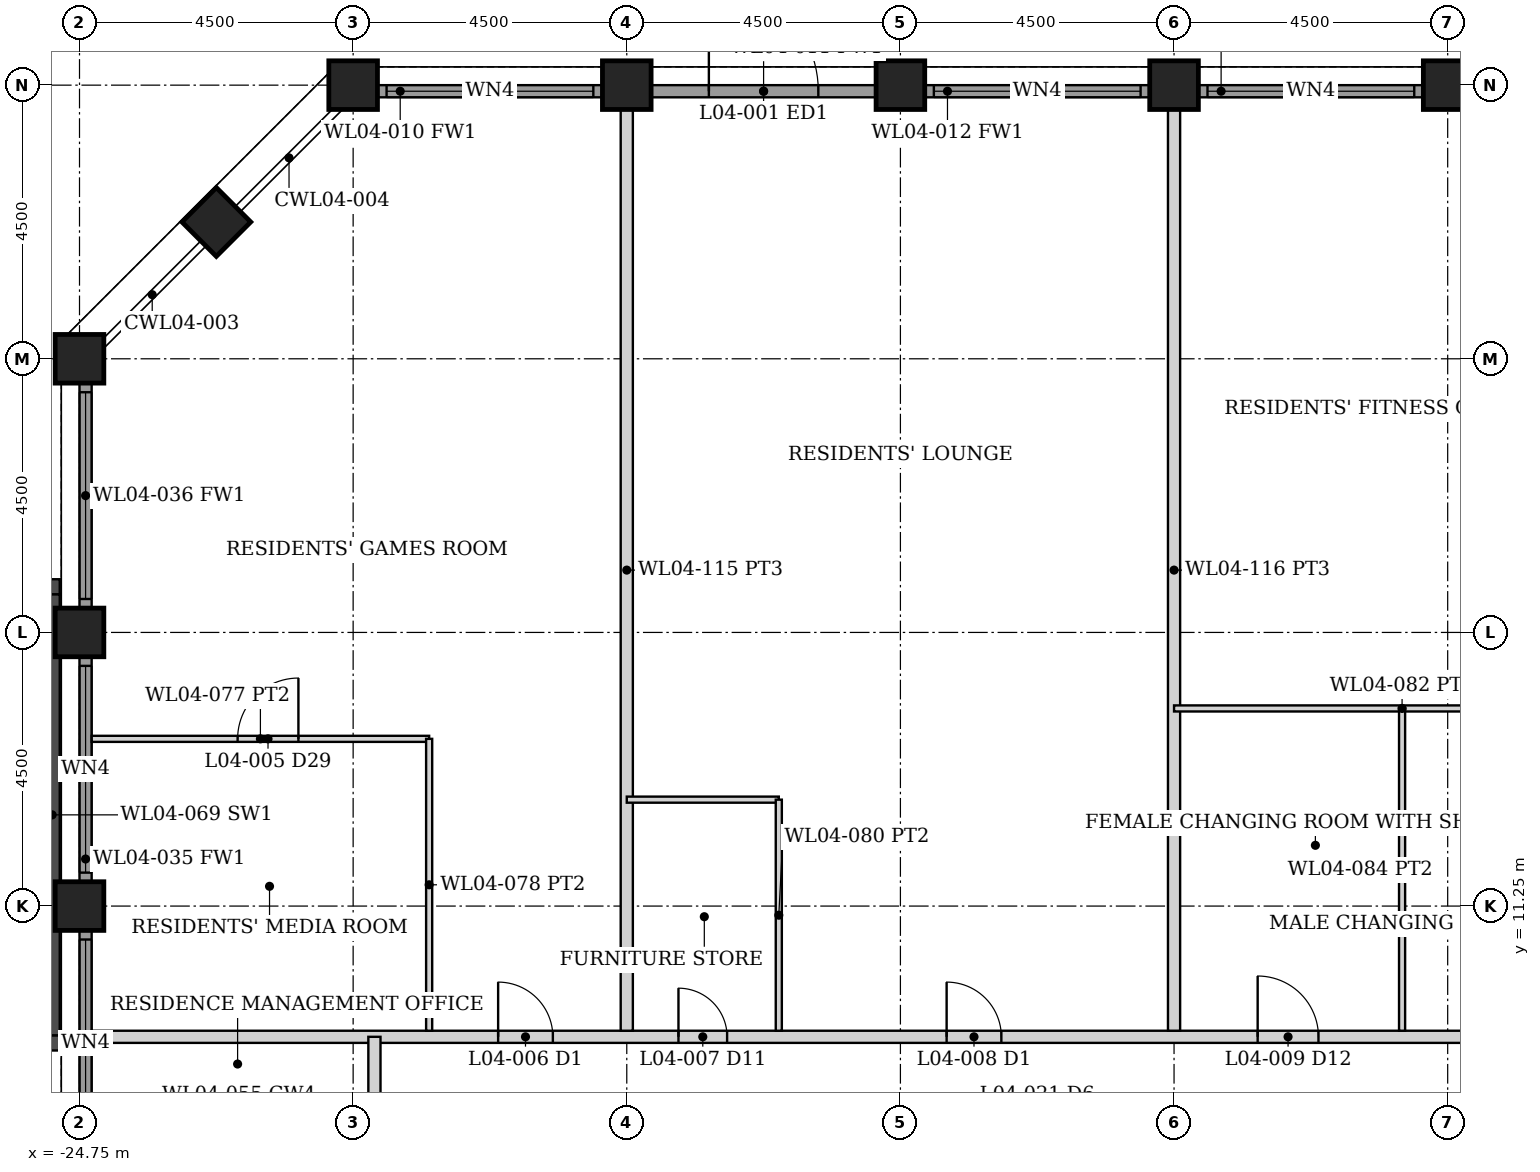
"""IFC4 building model, lengths in metres.
Left out: names, types, materials, properties, quantities, classifications, styles, units other than length and angle.
Written with IfcOpenShell. Run it as: python <this file> out.ifc"""

import sys

from ifc_helpers import new_model, si_unit, direction, frame, frame_2d, origin, origin_2d, place, context, subcontext, project, spatial, rectangle, hollow_rectangle, extrude, element, fill, save


model = new_model("IFC4")
c1 = context("Model", 3, precision=1e-05, world=origin(), true_north=direction((0.0, 1.0)))
c2 = subcontext(c1, "Body", "Model", "MODEL_VIEW")
j1 = project(units=[si_unit("LENGTHUNIT", "METRE"), si_unit("PLANEANGLEUNIT", "RADIAN")], contexts=[c1])
p1 = place(None, origin())
s1 = spatial("IfcSite", under=j1, at=p1, CompositionType="ELEMENT")
p2 = place(p1, origin())
s2 = spatial("IfcBuilding", under=s1, at=p2, CompositionType="ELEMENT")
p3 = place(p2, frame((0.0, 0.0, 21.5)))
s3 = spatial("IfcBuildingStorey", under=s2, at=p3, CompositionType="ELEMENT", Elevation=21.5)
for number, where, z_axis, x_axis in (
    (1, (-20.25, 24.75, 0.0), (0.0, 0.0, 1.0), (0.0, 1.0, 0.0)),
    (2, (-15.75, 24.75, 0.0), (0.0, 0.0, 1.0), (0.0, 1.0, 0.0)),
    (3, (-11.25, 24.75, 0.0), (0.0, 0.0, 1.0), (0.0, 1.0, 0.0)),
    (4, (-6.75, 24.75, 0.0), (0.0, 0.0, 1.0), (0.0, 1.0, 0.0)),
    (5, (-2.25, 24.75, 0.0), (0.0, 0.0, 1.0), (0.0, 1.0, 0.0)),
    (6, (-24.75, 11.25, 0.0), (0.0, 0.0, 1.0), (1.0, 0.0, 0.0)),
    (7, (-24.75, 15.75, 0.0), (0.0, 0.0, 1.0), (1.0, 0.0, 0.0)),
    (8, (-24.75, 20.25, 0.0), (0.0, 0.0, 1.0), (1.0, 0.0, 0.0)),
    (9, (-22.5, 22.5, 0.0), (0.0, 0.0, 1.0), (0.707, -0.707, 0.0)),
):
    element("IfcColumn", number, at=place(p3, frame(where, z_axis=z_axis, x_axis=x_axis)), inside=s3, PredefinedType="COLUMN", context=c2, shape_type="SweptSolid", body=[
        extrude(hollow_rectangle(XDim=0.8, YDim=0.8, WallThickness=0.08, at=origin_2d()), origin(), (0.0, 0.0, 1.0), 5.0),
    ])
p4 = place(p3, frame((-28.625, 9.0, 0.0), z_axis=(0.0, 0.0, 1.0), x_axis=(1.0, 0.0, 0.0)))
e10 = element("IfcWall", 10, at=p4, inside=s3, PredefinedType="SHEAR", context=c2, shape_type="SweptSolid", body=[
    extrude(rectangle(XDim=3.55, YDim=0.25, at=frame_2d((1.775, 0.0))), origin(), (0.0, 0.0, 1.0), 5.0),
])
p5 = place(p4, frame((1.875, 0.0, 0.0)))
e11 = element("IfcOpeningElement", 11, at=p5, cuts=e10, PredefinedType="OPENING", context=c2, shape_type="SweptSolid", body=[
    extrude(rectangle(XDim=1.2, YDim=2.2, at=frame_2d((0.6, 1.1))), frame((0.0, 0.135, 0.0), z_axis=(0.0, -1.0, 0.0), x_axis=(1.0, 0.0, 0.0)), (0.0, 0.0, 1.0), 0.27),
])
p6 = place(p3, frame((-28.625, 16.5, 0.0), z_axis=(0.0, 0.0, 1.0), x_axis=(1.0, 0.0, 0.0)))
e12 = element("IfcWall", 12, at=p6, inside=s3, PredefinedType="SHEAR", context=c2, shape_type="SweptSolid", body=[
    extrude(rectangle(XDim=3.55, YDim=0.25, at=frame_2d((1.775, 0.0))), origin(), (0.0, 0.0, 1.0), 5.0),
])
p7 = place(p3, frame((-25.2, 9.125, 0.0), z_axis=(0.0, 0.0, 1.0), x_axis=(0.0, 1.0, 0.0)))
e13 = element("IfcWall", 13, at=p7, inside=s3, PredefinedType="SHEAR", context=c2, shape_type="SweptSolid", body=[
    extrude(rectangle(XDim=7.25, YDim=0.25, at=frame_2d((3.625, 0.0))), origin(), (0.0, 0.0, 1.0), 5.0),
])
p8 = place(p3, frame((-19.845, 24.65, 0.0), z_axis=(0.0, 0.0, 1.0), x_axis=(1.0, 0.0, 0.0)))
e14 = element("IfcWall", 14, at=p8, inside=s3, PredefinedType="SOLIDWALL", context=c2, shape_type="SweptSolid", body=[
    extrude(rectangle(XDim=3.69, YDim=0.2, at=frame_2d((1.845, 0.0))), origin(), (0.0, 0.0, 1.0), 3.879),
])
p9 = place(p8, frame((0.145, 0.0, 0.3)))
e15 = element("IfcOpeningElement", 15, at=p9, cuts=e14, PredefinedType="OPENING", context=c2, shape_type="SweptSolid", body=[
    extrude(rectangle(XDim=3.4, YDim=3.429, at=frame_2d((1.7, 1.714))), frame((0.0, 0.11, 0.0), z_axis=(0.0, -1.0, 0.0), x_axis=(1.0, 0.0, 0.0)), (0.0, 0.0, 1.0), 0.22),
])
p10 = place(p3, frame((-15.345, 24.65, 0.0), z_axis=(0.0, 0.0, 1.0), x_axis=(1.0, 0.0, 0.0)))
e16 = element("IfcWall", 16, at=p10, inside=s3, PredefinedType="SOLIDWALL", context=c2, shape_type="SweptSolid", body=[
    extrude(rectangle(XDim=3.69, YDim=0.2, at=frame_2d((1.845, 0.0))), origin(), (0.0, 0.0, 1.0), 3.879),
])
p11 = place(p10, frame((0.945, 0.0, 0.0)))
e17 = element("IfcOpeningElement", 17, at=p11, cuts=e16, PredefinedType="OPENING", context=c2, shape_type="SweptSolid", body=[
    extrude(rectangle(XDim=1.8, YDim=2.4, at=frame_2d((0.9, 1.2))), frame((0.0, 0.11, 0.0), z_axis=(0.0, -1.0, 0.0), x_axis=(1.0, 0.0, 0.0)), (0.0, 0.0, 1.0), 0.22),
])
p12 = place(p3, frame((-10.845, 24.65, 0.0), z_axis=(0.0, 0.0, 1.0), x_axis=(1.0, 0.0, 0.0)))
e18 = element("IfcWall", 18, at=p12, inside=s3, PredefinedType="SOLIDWALL", context=c2, shape_type="SweptSolid", body=[
    extrude(rectangle(XDim=3.69, YDim=0.2, at=frame_2d((1.845, 0.0))), origin(), (0.0, 0.0, 1.0), 3.879),
])
p13 = place(p12, frame((0.145, 0.0, 0.3)))
e19 = element("IfcOpeningElement", 19, at=p13, cuts=e18, PredefinedType="OPENING", context=c2, shape_type="SweptSolid", body=[
    extrude(rectangle(XDim=3.4, YDim=3.429, at=frame_2d((1.7, 1.714))), frame((0.0, 0.11, 0.0), z_axis=(0.0, -1.0, 0.0), x_axis=(1.0, 0.0, 0.0)), (0.0, 0.0, 1.0), 0.22),
])
p14 = place(p3, frame((-6.345, 24.65, 0.0), z_axis=(0.0, 0.0, 1.0), x_axis=(1.0, 0.0, 0.0)))
e20 = element("IfcWall", 20, at=p14, inside=s3, PredefinedType="SOLIDWALL", context=c2, shape_type="SweptSolid", body=[
    extrude(rectangle(XDim=3.69, YDim=0.2, at=frame_2d((1.845, 0.0))), origin(), (0.0, 0.0, 1.0), 3.879),
])
p15 = place(p14, frame((0.145, 0.0, 0.3)))
e21 = element("IfcOpeningElement", 21, at=p15, cuts=e20, PredefinedType="OPENING", context=c2, shape_type="SweptSolid", body=[
    extrude(rectangle(XDim=3.4, YDim=3.429, at=frame_2d((1.7, 1.714))), frame((0.0, 0.11, 0.0), z_axis=(0.0, -1.0, 0.0), x_axis=(1.0, 0.0, 0.0)), (0.0, 0.0, 1.0), 0.22),
])
p16 = place(p3, frame((-24.65, 7.155, 0.0), z_axis=(0.0, 0.0, 1.0), x_axis=(0.0, 1.0, 0.0)))
e22 = element("IfcWall", 22, at=p16, inside=s3, PredefinedType="SOLIDWALL", context=c2, shape_type="SweptSolid", body=[
    extrude(rectangle(XDim=3.69, YDim=0.2, at=frame_2d((1.845, 0.0))), origin(), (0.0, 0.0, 1.0), 3.879),
])
p17 = place(p16, frame((0.145, 0.0, 0.3)))
e23 = element("IfcOpeningElement", 23, at=p17, cuts=e22, PredefinedType="OPENING", context=c2, shape_type="SweptSolid", body=[
    extrude(rectangle(XDim=3.4, YDim=3.429, at=frame_2d((1.7, 1.714))), frame((0.0, 0.11, 0.0), z_axis=(0.0, -1.0, 0.0), x_axis=(1.0, 0.0, 0.0)), (0.0, 0.0, 1.0), 0.22),
])
p18 = place(p3, frame((-24.65, 11.655, 0.0), z_axis=(0.0, 0.0, 1.0), x_axis=(0.0, 1.0, 0.0)))
e24 = element("IfcWall", 24, at=p18, inside=s3, PredefinedType="SOLIDWALL", context=c2, shape_type="SweptSolid", body=[
    extrude(rectangle(XDim=3.69, YDim=0.2, at=frame_2d((1.845, 0.0))), origin(), (0.0, 0.0, 1.0), 3.879),
])
p19 = place(p18, frame((0.145, 0.0, 0.3)))
e25 = element("IfcOpeningElement", 25, at=p19, cuts=e24, PredefinedType="OPENING", context=c2, shape_type="SweptSolid", body=[
    extrude(rectangle(XDim=3.4, YDim=3.429, at=frame_2d((1.7, 1.714))), frame((0.0, 0.11, 0.0), z_axis=(0.0, -1.0, 0.0), x_axis=(1.0, 0.0, 0.0)), (0.0, 0.0, 1.0), 0.22),
])
p20 = place(p3, frame((-24.65, 16.155, 0.0), z_axis=(0.0, 0.0, 1.0), x_axis=(0.0, 1.0, 0.0)))
e26 = element("IfcWall", 26, at=p20, inside=s3, PredefinedType="SOLIDWALL", context=c2, shape_type="SweptSolid", body=[
    extrude(rectangle(XDim=3.69, YDim=0.2, at=frame_2d((1.845, 0.0))), origin(), (0.0, 0.0, 1.0), 3.879),
])
p21 = place(p20, frame((0.145, 0.0, 0.3)))
e27 = element("IfcOpeningElement", 27, at=p21, cuts=e26, PredefinedType="OPENING", context=c2, shape_type="SweptSolid", body=[
    extrude(rectangle(XDim=3.4, YDim=3.429, at=frame_2d((1.7, 1.714))), frame((0.0, 0.11, 0.0), z_axis=(0.0, -1.0, 0.0), x_axis=(1.0, 0.0, 0.0)), (0.0, 0.0, 1.0), 0.22),
])
p22 = place(p3, frame((-24.55, 9.1, 0.0), z_axis=(0.0, 0.0, 1.0), x_axis=(1.0, 0.0, 0.0)))
e28 = element("IfcWall", 28, at=p22, inside=s3, PredefinedType="PARTITIONING", context=c2, shape_type="SweptSolid", body=[
    extrude(rectangle(XDim=49.1, YDim=0.2, at=frame_2d((24.55, 0.0))), origin(), (0.0, 0.0, 1.0), 3.873),
])
p23 = place(p22, frame((6.684, 0.0, 0.0)))
e29 = element("IfcOpeningElement", 29, at=p23, cuts=e28, PredefinedType="OPENING", context=c2, shape_type="SweptSolid", body=[
    extrude(rectangle(XDim=0.9, YDim=2.1, at=frame_2d((0.45, 1.05))), frame((0.0, 0.11, 0.0), z_axis=(0.0, -1.0, 0.0), x_axis=(1.0, 0.0, 0.0)), (0.0, 0.0, 1.0), 0.22),
])
p24 = place(p22, frame((14.06, 0.0, 0.0)))
e30 = element("IfcOpeningElement", 30, at=p24, cuts=e28, PredefinedType="OPENING", context=c2, shape_type="SweptSolid", body=[
    extrude(rectangle(XDim=0.9, YDim=2.1, at=frame_2d((0.45, 1.05))), frame((0.0, 0.11, 0.0), z_axis=(0.0, -1.0, 0.0), x_axis=(1.0, 0.0, 0.0)), (0.0, 0.0, 1.0), 0.22),
])
p25 = place(p22, frame((9.65, 0.0, 0.0)))
e31 = element("IfcOpeningElement", 31, at=p25, cuts=e28, PredefinedType="OPENING", context=c2, shape_type="SweptSolid", body=[
    extrude(rectangle(XDim=0.8, YDim=2.1, at=frame_2d((0.4, 1.05))), frame((0.0, 0.11, 0.0), z_axis=(0.0, -1.0, 0.0), x_axis=(1.0, 0.0, 0.0)), (0.0, 0.0, 1.0), 0.22),
])
p26 = place(p22, frame((25.592, 0.0, 0.0)))
e32 = element("IfcOpeningElement", 32, at=p26, cuts=e28, PredefinedType="OPENING", context=c2, shape_type="SweptSolid", body=[
    extrude(rectangle(XDim=0.9, YDim=2.1, at=frame_2d((0.45, 1.05))), frame((0.0, 0.11, 0.0), z_axis=(0.0, -1.0, 0.0), x_axis=(1.0, 0.0, 0.0)), (0.0, 0.0, 1.0), 0.22),
])
p27 = place(p22, frame((27.368, 0.0, 0.0)))
e33 = element("IfcOpeningElement", 33, at=p27, cuts=e28, PredefinedType="OPENING", context=c2, shape_type="SweptSolid", body=[
    extrude(rectangle(XDim=0.9, YDim=2.1, at=frame_2d((0.45, 1.05))), frame((0.0, 0.11, 0.0), z_axis=(0.0, -1.0, 0.0), x_axis=(1.0, 0.0, 0.0)), (0.0, 0.0, 1.0), 0.22),
])
p28 = place(p22, frame((19.175, 0.0, 0.0)))
e34 = element("IfcOpeningElement", 34, at=p28, cuts=e28, PredefinedType="OPENING", context=c2, shape_type="SweptSolid", body=[
    extrude(rectangle(XDim=1.0, YDim=2.1, at=frame_2d((0.5, 1.05))), frame((0.0, 0.11, 0.0), z_axis=(0.0, -1.0, 0.0), x_axis=(1.0, 0.0, 0.0)), (0.0, 0.0, 1.0), 0.22),
])
p29 = place(p22, frame((22.925, 0.0, 0.0)))
e35 = element("IfcOpeningElement", 35, at=p29, cuts=e28, PredefinedType="OPENING", context=c2, shape_type="SweptSolid", body=[
    extrude(rectangle(XDim=1.0, YDim=2.1, at=frame_2d((0.5, 1.05))), frame((0.0, 0.11, 0.0), z_axis=(0.0, -1.0, 0.0), x_axis=(1.0, 0.0, 0.0)), (0.0, 0.0, 1.0), 0.22),
])
p30 = place(p22, frame((29.65, 0.0, 0.0)))
e36 = element("IfcOpeningElement", 36, at=p30, cuts=e28, PredefinedType="OPENING", context=c2, shape_type="SweptSolid", body=[
    extrude(rectangle(XDim=0.8, YDim=2.1, at=frame_2d((0.4, 1.05))), frame((0.0, 0.11, 0.0), z_axis=(0.0, -1.0, 0.0), x_axis=(1.0, 0.0, 0.0)), (0.0, 0.0, 1.0), 0.22),
])
p31 = place(p22, frame((35.375, 0.0, 0.0)))
e37 = element("IfcOpeningElement", 37, at=p31, cuts=e28, PredefinedType="OPENING", context=c2, shape_type="SweptSolid", body=[
    extrude(rectangle(XDim=0.9, YDim=2.1, at=frame_2d((0.45, 1.05))), frame((0.0, 0.11, 0.0), z_axis=(0.0, -1.0, 0.0), x_axis=(1.0, 0.0, 0.0)), (0.0, 0.0, 1.0), 0.22),
])
p32 = place(p22, frame((41.55, 0.0, 0.0)))
e38 = element("IfcOpeningElement", 38, at=p32, cuts=e28, PredefinedType="OPENING", context=c2, shape_type="SweptSolid", body=[
    extrude(rectangle(XDim=1.0, YDim=2.1, at=frame_2d((0.5, 1.05))), frame((0.0, 0.11, 0.0), z_axis=(0.0, -1.0, 0.0), x_axis=(1.0, 0.0, 0.0)), (0.0, 0.0, 1.0), 0.22),
])
p33 = place(p3, frame((-19.9, -9.1, 0.0), z_axis=(0.0, 0.0, 1.0), x_axis=(0.0, 1.0, 0.0)))
e39 = element("IfcWall", 39, at=p33, inside=s3, PredefinedType="PARTITIONING", context=c2, shape_type="SweptSolid", body=[
    extrude(rectangle(XDim=18.2, YDim=0.2, at=frame_2d((9.1, 0.0))), origin(), (0.0, 0.0, 1.0), 3.873),
])
p34 = place(p33, frame((0.825, 0.0, 0.0)))
e40 = element("IfcOpeningElement", 40, at=p34, cuts=e39, PredefinedType="OPENING", context=c2, shape_type="SweptSolid", body=[
    extrude(rectangle(XDim=0.8, YDim=2.1, at=frame_2d((0.4, 1.05))), frame((0.0, 0.11, 0.0), z_axis=(0.0, -1.0, 0.0), x_axis=(1.0, 0.0, 0.0)), (0.0, 0.0, 1.0), 0.22),
])
p35 = place(p33, frame((6.4, 0.0, 0.0)))
e41 = element("IfcOpeningElement", 41, at=p35, cuts=e39, PredefinedType="OPENING", context=c2, shape_type="SweptSolid", body=[
    extrude(rectangle(XDim=0.9, YDim=2.1, at=frame_2d((0.45, 1.05))), frame((0.0, 0.11, 0.0), z_axis=(0.0, -1.0, 0.0), x_axis=(1.0, 0.0, 0.0)), (0.0, 0.0, 1.0), 0.22),
])
p36 = place(p33, frame((14.275, 0.0, 0.0)))
e42 = element("IfcOpeningElement", 42, at=p36, cuts=e39, PredefinedType="OPENING", context=c2, shape_type="SweptSolid", body=[
    extrude(rectangle(XDim=0.9, YDim=2.1, at=frame_2d((0.45, 1.05))), frame((0.0, 0.11, 0.0), z_axis=(0.0, -1.0, 0.0), x_axis=(1.0, 0.0, 0.0)), (0.0, 0.0, 1.0), 0.22),
])
for number, where, z_axis, x_axis in (
    (43, (-15.75, 9.2, 0.0), (0.0, 0.0, 1.0), (0.0, 1.0, 0.0)),
    (44, (-6.75, 9.2, 0.0), (0.0, 0.0, 1.0), (0.0, 1.0, 0.0)),
):
    element("IfcWall", number, at=place(p3, frame(where, z_axis=z_axis, x_axis=x_axis)), inside=s3, PredefinedType="PARTITIONING", context=c2, shape_type="SweptSolid", body=[
        extrude(rectangle(XDim=15.15, YDim=0.2, at=frame_2d((7.575, 0.0))), origin(), (0.0, 0.0, 1.0), 3.873),
    ])
p37 = place(p3, frame((-24.55, 14.0, 0.0), z_axis=(0.0, 0.0, 1.0), x_axis=(1.0, 0.0, 0.0)))
e45 = element("IfcWall", 45, at=p37, inside=s3, PredefinedType="PARTITIONING", context=c2, shape_type="SweptSolid", body=[
    extrude(rectangle(XDim=5.55, YDim=0.1, at=frame_2d((2.775, 0.0))), origin(), (0.0, 0.0, 1.0), 3.873),
])
p38 = place(p37, frame((2.4, 0.0, 0.0)))
e46 = element("IfcOpeningElement", 46, at=p38, cuts=e45, PredefinedType="OPENING", context=c2, shape_type="SweptSolid", body=[
    extrude(rectangle(XDim=1.0, YDim=2.1, at=frame_2d((0.5, 1.05))), frame((0.0, 0.06, 0.0), z_axis=(0.0, -1.0, 0.0), x_axis=(1.0, 0.0, 0.0)), (0.0, 0.0, 1.0), 0.12),
])
p39 = place(p3, frame((-19.0, 9.2, 0.0), z_axis=(0.0, 0.0, 1.0), x_axis=(0.0, 1.0, 0.0)))
e47 = element("IfcWall", 47, at=p39, inside=s3, PredefinedType="PARTITIONING", context=c2, shape_type="SweptSolid", body=[
    extrude(rectangle(XDim=4.8, YDim=0.1, at=frame_2d((2.4, 0.0))), origin(), (0.0, 0.0, 1.0), 3.873),
])
p40 = place(p3, frame((-15.75, 13.0, 0.0), z_axis=(0.0, 0.0, 1.0), x_axis=(1.0, 0.0, 0.0)))
e48 = element("IfcWall", 48, at=p40, inside=s3, PredefinedType="PARTITIONING", context=c2, shape_type="SweptSolid", body=[
    extrude(rectangle(XDim=2.5, YDim=0.1, at=frame_2d((1.25, 0.0))), origin(), (0.0, 0.0, 1.0), 3.873),
])
p41 = place(p3, frame((-13.25, 9.2, 0.0), z_axis=(0.0, 0.0, 1.0), x_axis=(0.0, 1.0, 0.0)))
e49 = element("IfcWall", 49, at=p41, inside=s3, PredefinedType="PARTITIONING", context=c2, shape_type="SweptSolid", body=[
    extrude(rectangle(XDim=3.8, YDim=0.1, at=frame_2d((1.9, 0.0))), origin(), (0.0, 0.0, 1.0), 3.873),
])
p42 = place(p3, frame((-6.75, 14.5, 0.0), z_axis=(0.0, 0.0, 1.0), x_axis=(1.0, 0.0, 0.0)))
e50 = element("IfcWall", 50, at=p42, inside=s3, PredefinedType="PARTITIONING", context=c2, shape_type="SweptSolid", body=[
    extrude(rectangle(XDim=7.5, YDim=0.1, at=frame_2d((3.75, 0.0))), origin(), (0.0, 0.0, 1.0), 3.873),
])
p43 = place(p3, frame((-3.0, 9.2, 0.0), z_axis=(0.0, 0.0, 1.0), x_axis=(0.0, 1.0, 0.0)))
e51 = element("IfcWall", 51, at=p43, inside=s3, PredefinedType="PARTITIONING", context=c2, shape_type="SweptSolid", body=[
    extrude(rectangle(XDim=5.3, YDim=0.1, at=frame_2d((2.65, 0.0))), origin(), (0.0, 0.0, 1.0), 3.873),
])
p44 = place(p9, origin())
e52 = element("IfcWindow", 52, at=p44, inside=s3, PartitioningType="SINGLE_PANEL", PredefinedType="WINDOW", context=c2, shape_type="SweptSolid", body=[
    extrude(rectangle(XDim=3.4, YDim=3.429, at=frame_2d((1.7, 1.714))), frame((0.0, 0.03, 0.0), z_axis=(0.0, -1.0, 0.0), x_axis=(1.0, 0.0, 0.0)), (0.0, 0.0, 1.0), 0.06),
])
fill(e15, e52)
p45 = place(p11, origin())
e53 = element("IfcDoor", 53, at=p45, inside=s3, OperationType="DOUBLE_DOOR_SINGLE_SWING", PredefinedType="DOOR", context=c2, shape_type="SweptSolid", body=[
    extrude(rectangle(XDim=1.8, YDim=2.4, at=frame_2d((0.9, 1.2))), frame((0.0, 0.025, 0.0), z_axis=(0.0, -1.0, 0.0), x_axis=(1.0, 0.0, 0.0)), (0.0, 0.0, 1.0), 0.05),
])
fill(e17, e53)
p46 = place(p13, origin())
e54 = element("IfcWindow", 54, at=p46, inside=s3, PartitioningType="SINGLE_PANEL", PredefinedType="WINDOW", context=c2, shape_type="SweptSolid", body=[
    extrude(rectangle(XDim=3.4, YDim=3.429, at=frame_2d((1.7, 1.714))), frame((0.0, 0.03, 0.0), z_axis=(0.0, -1.0, 0.0), x_axis=(1.0, 0.0, 0.0)), (0.0, 0.0, 1.0), 0.06),
])
fill(e19, e54)
p47 = place(p15, origin())
e55 = element("IfcWindow", 55, at=p47, inside=s3, PartitioningType="SINGLE_PANEL", PredefinedType="WINDOW", context=c2, shape_type="SweptSolid", body=[
    extrude(rectangle(XDim=3.4, YDim=3.429, at=frame_2d((1.7, 1.714))), frame((0.0, 0.03, 0.0), z_axis=(0.0, -1.0, 0.0), x_axis=(1.0, 0.0, 0.0)), (0.0, 0.0, 1.0), 0.06),
])
fill(e21, e55)
p48 = place(p17, origin())
e56 = element("IfcWindow", 56, at=p48, inside=s3, PartitioningType="SINGLE_PANEL", PredefinedType="WINDOW", context=c2, shape_type="SweptSolid", body=[
    extrude(rectangle(XDim=3.4, YDim=3.429, at=frame_2d((1.7, 1.714))), frame((0.0, 0.03, 0.0), z_axis=(0.0, -1.0, 0.0), x_axis=(1.0, 0.0, 0.0)), (0.0, 0.0, 1.0), 0.06),
])
fill(e23, e56)
p49 = place(p19, origin())
e57 = element("IfcWindow", 57, at=p49, inside=s3, PartitioningType="SINGLE_PANEL", PredefinedType="WINDOW", context=c2, shape_type="SweptSolid", body=[
    extrude(rectangle(XDim=3.4, YDim=3.429, at=frame_2d((1.7, 1.714))), frame((0.0, 0.03, 0.0), z_axis=(0.0, -1.0, 0.0), x_axis=(1.0, 0.0, 0.0)), (0.0, 0.0, 1.0), 0.06),
])
fill(e25, e57)
p50 = place(p21, origin())
e58 = element("IfcWindow", 58, at=p50, inside=s3, PartitioningType="SINGLE_PANEL", PredefinedType="WINDOW", context=c2, shape_type="SweptSolid", body=[
    extrude(rectangle(XDim=3.4, YDim=3.429, at=frame_2d((1.7, 1.714))), frame((0.0, 0.03, 0.0), z_axis=(0.0, -1.0, 0.0), x_axis=(1.0, 0.0, 0.0)), (0.0, 0.0, 1.0), 0.06),
])
fill(e27, e58)
p51 = place(p23, origin())
e59 = element("IfcDoor", 59, at=p51, inside=s3, OperationType="SINGLE_SWING_LEFT", PredefinedType="DOOR", context=c2, shape_type="SweptSolid", body=[
    extrude(rectangle(XDim=0.9, YDim=2.1, at=frame_2d((0.45, 1.05))), frame((0.0, 0.025, 0.0), z_axis=(0.0, -1.0, 0.0), x_axis=(1.0, 0.0, 0.0)), (0.0, 0.0, 1.0), 0.05),
])
fill(e29, e59)
p52 = place(p38, origin())
e60 = element("IfcDoor", 60, at=p52, inside=s3, OperationType="SINGLE_SWING_RIGHT", PredefinedType="DOOR", context=c2, shape_type="SweptSolid", body=[
    extrude(rectangle(XDim=1.0, YDim=2.1, at=frame_2d((0.5, 1.05))), frame((0.0, 0.025, 0.0), z_axis=(0.0, -1.0, 0.0), x_axis=(1.0, 0.0, 0.0)), (0.0, 0.0, 1.0), 0.05),
])
fill(e46, e60)
p53 = place(p24, origin())
e61 = element("IfcDoor", 61, at=p53, inside=s3, OperationType="SINGLE_SWING_LEFT", PredefinedType="DOOR", context=c2, shape_type="SweptSolid", body=[
    extrude(rectangle(XDim=0.9, YDim=2.1, at=frame_2d((0.45, 1.05))), frame((0.0, 0.025, 0.0), z_axis=(0.0, -1.0, 0.0), x_axis=(1.0, 0.0, 0.0)), (0.0, 0.0, 1.0), 0.05),
])
fill(e30, e61)
p54 = place(p25, origin())
e62 = element("IfcDoor", 62, at=p54, inside=s3, OperationType="SINGLE_SWING_LEFT", PredefinedType="DOOR", context=c2, shape_type="SweptSolid", body=[
    extrude(rectangle(XDim=0.8, YDim=2.1, at=frame_2d((0.4, 1.05))), frame((0.0, 0.025, 0.0), z_axis=(0.0, -1.0, 0.0), x_axis=(1.0, 0.0, 0.0)), (0.0, 0.0, 1.0), 0.05),
])
fill(e31, e62)
p55 = place(p28, origin())
e63 = element("IfcDoor", 63, at=p55, inside=s3, OperationType="SINGLE_SWING_LEFT", PredefinedType="DOOR", context=c2, shape_type="SweptSolid", body=[
    extrude(rectangle(XDim=1.0, YDim=2.1, at=frame_2d((0.5, 1.05))), frame((0.0, 0.025, 0.0), z_axis=(0.0, -1.0, 0.0), x_axis=(1.0, 0.0, 0.0)), (0.0, 0.0, 1.0), 0.05),
])
fill(e34, e63)
save(model, sys.argv[1])
